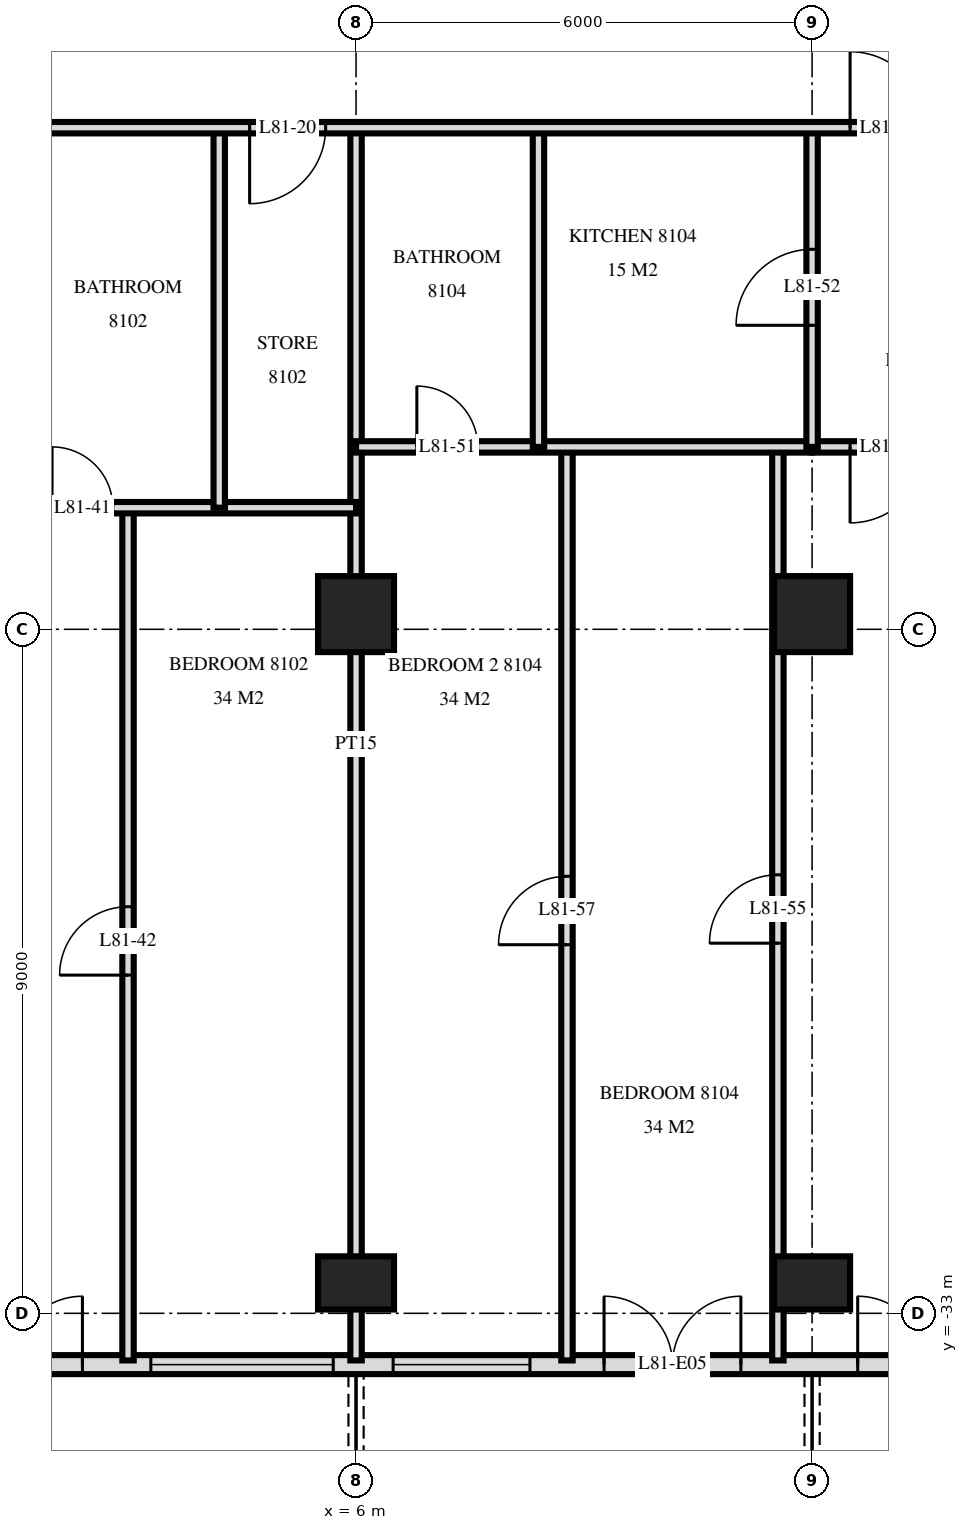
"""IFC4 building model, lengths in metres.
Left out: names, types, materials, properties, quantities, classifications, styles, units other than length and angle.
Written with IfcOpenShell. Run it as: python <this file> out.ifc"""

import sys

from ifc_helpers import new_model, si_unit, direction, frame, frame_2d, origin, origin_2d, place, context, subcontext, project, spatial, rectangle, extrude, element, fill, save


model = new_model("IFC4")
c1 = context("Model", 3, precision=1e-05, world=origin(), true_north=direction((0.0, 1.0)))
c2 = subcontext(c1, "Body", "Model", "MODEL_VIEW")
j1 = project(units=[si_unit("LENGTHUNIT", "METRE"), si_unit("PLANEANGLEUNIT", "RADIAN")], contexts=[c1])
p1 = place(None, origin())
s1 = spatial("IfcSite", under=j1, at=p1, CompositionType="ELEMENT")
p2 = place(p1, origin())
s2 = spatial("IfcBuilding", under=s1, at=p2, CompositionType="ELEMENT")
p3 = place(p2, frame((0.0, 0.0, 305.1)))
s3 = spatial("IfcBuildingStorey", under=s2, at=p3, CompositionType="ELEMENT", Elevation=305.1)
p4 = place(p3, frame((6.0, -32.6, 0.0), z_axis=(0.0, 0.0, 1.0), x_axis=(1.0, 0.0, 0.0)))
e1 = element("IfcColumn", 1, at=p4, inside=s3, PredefinedType="COLUMN", context=c2, shape_type="SweptSolid", body=[
    extrude(rectangle(XDim=1.0, YDim=0.7, at=origin_2d()), origin(), (0.0, 0.0, 1.0), 3.5),
])
p5 = place(p3, frame((6.0, -23.8, 0.0), z_axis=(0.0, 0.0, 1.0), x_axis=(1.0, 0.0, 0.0)))
e2 = element("IfcColumn", 2, at=p5, inside=s3, PredefinedType="COLUMN", context=c2, shape_type="SweptSolid", body=[
    extrude(rectangle(XDim=1.0, YDim=1.0, at=origin_2d()), origin(), (0.0, 0.0, 1.0), 3.5),
])
p6 = place(p3, frame((12.0, -32.6, 0.0), z_axis=(0.0, 0.0, 1.0), x_axis=(1.0, 0.0, 0.0)))
e3 = element("IfcColumn", 3, at=p6, inside=s3, PredefinedType="COLUMN", context=c2, shape_type="SweptSolid", body=[
    extrude(rectangle(XDim=1.0, YDim=0.7, at=origin_2d()), origin(), (0.0, 0.0, 1.0), 3.5),
])
p7 = place(p3, frame((12.0, -23.8, 0.0), z_axis=(0.0, 0.0, 1.0), x_axis=(1.0, 0.0, 0.0)))
e4 = element("IfcColumn", 4, at=p7, inside=s3, PredefinedType="COLUMN", context=c2, shape_type="SweptSolid", body=[
    extrude(rectangle(XDim=1.0, YDim=1.0, at=origin_2d()), origin(), (0.0, 0.0, 1.0), 3.5),
])
p8 = place(p3, frame((-18.575, -33.675, 0.0), z_axis=(0.0, 0.0, 1.0), x_axis=(1.0, 0.0, 0.0)))
e5 = element("IfcWall", 5, at=p8, inside=s3, PredefinedType="SOLIDWALL", context=c2, shape_type="SweptSolid", body=[
    extrude(rectangle(XDim=37.151, YDim=0.25, at=frame_2d((18.575, 0.0))), origin(), (0.0, 0.0, 1.0), 3.2),
])
p9 = place(p8, frame((1.175, 0.0, 0.0)))
e6 = element("IfcOpeningElement", 6, at=p9, cuts=e5, PredefinedType="OPENING", context=c2, shape_type="SweptSolid", body=[
    extrude(rectangle(XDim=1.8, YDim=2.4, at=frame_2d((0.9, 1.2))), frame((0.0, 0.135, 0.0), z_axis=(0.0, -1.0, 0.0), x_axis=(1.0, 0.0, 0.0)), (0.0, 0.0, 1.0), 0.27),
])
p10 = place(p8, frame((5.637, 0.0, 0.9)))
e7 = element("IfcOpeningElement", 7, at=p10, cuts=e5, PredefinedType="OPENING", context=c2, shape_type="SweptSolid", body=[
    extrude(rectangle(XDim=1.8, YDim=1.5, at=frame_2d((0.9, 0.75))), frame((0.0, 0.135, 0.0), z_axis=(0.0, -1.0, 0.0), x_axis=(1.0, 0.0, 0.0)), (0.0, 0.0, 1.0), 0.27),
])
p11 = place(p8, frame((7.663, 0.0, 0.0)))
e8 = element("IfcOpeningElement", 8, at=p11, cuts=e5, PredefinedType="OPENING", context=c2, shape_type="SweptSolid", body=[
    extrude(rectangle(XDim=1.8, YDim=2.4, at=frame_2d((0.9, 1.2))), frame((0.0, 0.135, 0.0), z_axis=(0.0, -1.0, 0.0), x_axis=(1.0, 0.0, 0.0)), (0.0, 0.0, 1.0), 0.27),
])
p12 = place(p8, frame((9.875, 0.0, 0.9)))
e9 = element("IfcOpeningElement", 9, at=p12, cuts=e5, PredefinedType="OPENING", context=c2, shape_type="SweptSolid", body=[
    extrude(rectangle(XDim=2.4, YDim=1.5, at=frame_2d((1.2, 0.75))), frame((0.0, 0.135, 0.0), z_axis=(0.0, -1.0, 0.0), x_axis=(1.0, 0.0, 0.0)), (0.0, 0.0, 1.0), 0.27),
])
p13 = place(p8, frame((13.175, 0.0, 0.0)))
e10 = element("IfcOpeningElement", 10, at=p13, cuts=e5, PredefinedType="OPENING", context=c2, shape_type="SweptSolid", body=[
    extrude(rectangle(XDim=1.8, YDim=2.4, at=frame_2d((0.9, 1.2))), frame((0.0, 0.135, 0.0), z_axis=(0.0, -1.0, 0.0), x_axis=(1.0, 0.0, 0.0)), (0.0, 0.0, 1.0), 0.27),
])
p14 = place(p8, frame((15.875, 0.0, 0.9)))
e11 = element("IfcOpeningElement", 11, at=p14, cuts=e5, PredefinedType="OPENING", context=c2, shape_type="SweptSolid", body=[
    extrude(rectangle(XDim=2.4, YDim=1.5, at=frame_2d((1.2, 0.75))), frame((0.0, 0.135, 0.0), z_axis=(0.0, -1.0, 0.0), x_axis=(1.0, 0.0, 0.0)), (0.0, 0.0, 1.0), 0.27),
])
p15 = place(p8, frame((19.175, 0.0, 0.0)))
e12 = element("IfcOpeningElement", 12, at=p15, cuts=e5, PredefinedType="OPENING", context=c2, shape_type="SweptSolid", body=[
    extrude(rectangle(XDim=1.8, YDim=2.4, at=frame_2d((0.9, 1.2))), frame((0.0, 0.135, 0.0), z_axis=(0.0, -1.0, 0.0), x_axis=(1.0, 0.0, 0.0)), (0.0, 0.0, 1.0), 0.27),
])
p16 = place(p8, frame((21.875, 0.0, 0.9)))
e13 = element("IfcOpeningElement", 13, at=p16, cuts=e5, PredefinedType="OPENING", context=c2, shape_type="SweptSolid", body=[
    extrude(rectangle(XDim=2.4, YDim=1.5, at=frame_2d((1.2, 0.75))), frame((0.0, 0.135, 0.0), z_axis=(0.0, -1.0, 0.0), x_axis=(1.0, 0.0, 0.0)), (0.0, 0.0, 1.0), 0.27),
])
p17 = place(p8, frame((25.063, 0.0, 0.9)))
e14 = element("IfcOpeningElement", 14, at=p17, cuts=e5, PredefinedType="OPENING", context=c2, shape_type="SweptSolid", body=[
    extrude(rectangle(XDim=1.8, YDim=1.5, at=frame_2d((0.9, 0.75))), frame((0.0, 0.135, 0.0), z_axis=(0.0, -1.0, 0.0), x_axis=(1.0, 0.0, 0.0)), (0.0, 0.0, 1.0), 0.27),
])
p18 = place(p8, frame((27.838, 0.0, 0.0)))
e15 = element("IfcOpeningElement", 15, at=p18, cuts=e5, PredefinedType="OPENING", context=c2, shape_type="SweptSolid", body=[
    extrude(rectangle(XDim=1.8, YDim=2.4, at=frame_2d((0.9, 1.2))), frame((0.0, 0.135, 0.0), z_axis=(0.0, -1.0, 0.0), x_axis=(1.0, 0.0, 0.0)), (0.0, 0.0, 1.0), 0.27),
])
p19 = place(p8, frame((31.175, 0.0, 0.0)))
e16 = element("IfcOpeningElement", 16, at=p19, cuts=e5, PredefinedType="OPENING", context=c2, shape_type="SweptSolid", body=[
    extrude(rectangle(XDim=1.8, YDim=2.4, at=frame_2d((0.9, 1.2))), frame((0.0, 0.135, 0.0), z_axis=(0.0, -1.0, 0.0), x_axis=(1.0, 0.0, 0.0)), (0.0, 0.0, 1.0), 0.27),
])
p20 = place(p3, frame((12.0, -21.6, 0.0), z_axis=(0.0, 0.0, 1.0), x_axis=(0.0, 1.0, 0.0)))
e17 = element("IfcWall", 17, at=p20, inside=s3, PredefinedType="PARTITIONING", context=c2, shape_type="SweptSolid", body=[
    extrude(rectangle(XDim=4.2, YDim=0.15, at=frame_2d((2.1, 0.0))), origin(), (0.0, 0.0, 1.0), 3.22),
])
p21 = place(p20, frame((1.6, 0.0, 0.0)))
e18 = element("IfcOpeningElement", 18, at=p21, cuts=e17, PredefinedType="OPENING", context=c2, shape_type="SweptSolid", body=[
    extrude(rectangle(XDim=1.0, YDim=2.1, at=frame_2d((0.5, 1.05))), frame((0.0, 0.085, 0.0), z_axis=(0.0, -1.0, 0.0), x_axis=(1.0, 0.0, 0.0)), (0.0, 0.0, 1.0), 0.17),
])
p22 = place(p3, frame((11.55, -33.62, 0.0), z_axis=(0.0, 0.0, 1.0), x_axis=(0.0, 1.0, 0.0)))
e19 = element("IfcWall", 19, at=p22, inside=s3, PredefinedType="PARTITIONING", context=c2, shape_type="SweptSolid", body=[
    extrude(rectangle(XDim=12.02, YDim=0.15, at=frame_2d((6.01, 0.0))), origin(), (0.0, 0.0, 1.0), 3.22),
])
p23 = place(p22, frame((5.49, 0.0, 0.0)))
e20 = element("IfcOpeningElement", 20, at=p23, cuts=e19, PredefinedType="OPENING", context=c2, shape_type="SweptSolid", body=[
    extrude(rectangle(XDim=0.9, YDim=2.1, at=frame_2d((0.45, 1.05))), frame((0.0, 0.085, 0.0), z_axis=(0.0, -1.0, 0.0), x_axis=(1.0, 0.0, 0.0)), (0.0, 0.0, 1.0), 0.17),
])
p24 = place(p3, frame((8.775, -33.62, 0.0), z_axis=(0.0, 0.0, 1.0), x_axis=(0.0, 1.0, 0.0)))
e21 = element("IfcWall", 21, at=p24, inside=s3, PredefinedType="PARTITIONING", context=c2, shape_type="SweptSolid", body=[
    extrude(rectangle(XDim=12.02, YDim=0.15, at=frame_2d((6.01, 0.0))), origin(), (0.0, 0.0, 1.0), 3.22),
])
p25 = place(p24, frame((5.47, 0.0, 0.0)))
e22 = element("IfcOpeningElement", 22, at=p25, cuts=e21, PredefinedType="OPENING", context=c2, shape_type="SweptSolid", body=[
    extrude(rectangle(XDim=0.9, YDim=2.1, at=frame_2d((0.45, 1.05))), frame((0.0, 0.085, 0.0), z_axis=(0.0, -1.0, 0.0), x_axis=(1.0, 0.0, 0.0)), (0.0, 0.0, 1.0), 0.17),
])
p26 = place(p3, frame((8.4, -21.6, 0.0), z_axis=(0.0, 0.0, 1.0), x_axis=(0.0, 1.0, 0.0)))
e23 = element("IfcWall", 23, at=p26, inside=s3, PredefinedType="PARTITIONING", context=c2, shape_type="SweptSolid", body=[
    extrude(rectangle(XDim=4.2, YDim=0.15, at=frame_2d((2.1, 0.0))), origin(), (0.0, 0.0, 1.0), 3.22),
])
p27 = place(p3, frame((6.0, -33.62, 0.0), z_axis=(0.0, 0.0, 1.0), x_axis=(0.0, 1.0, 0.0)))
e24 = element("IfcWall", 24, at=p27, inside=s3, PredefinedType="PARTITIONING", context=c2, shape_type="SweptSolid", body=[
    extrude(rectangle(XDim=16.22, YDim=0.15, at=frame_2d((8.11, 0.0))), origin(), (0.0, 0.0, 1.0), 3.22),
])
p28 = place(p3, frame((4.2, -22.4, 0.0), z_axis=(0.0, 0.0, 1.0), x_axis=(0.0, 1.0, 0.0)))
e25 = element("IfcWall", 25, at=p28, inside=s3, PredefinedType="PARTITIONING", context=c2, shape_type="SweptSolid", body=[
    extrude(rectangle(XDim=5.0, YDim=0.15, at=frame_2d((2.5, 0.0))), origin(), (0.0, 0.0, 1.0), 3.22),
])
p29 = place(p3, frame((3.0, -33.62, 0.0), z_axis=(0.0, 0.0, 1.0), x_axis=(0.0, 1.0, 0.0)))
e26 = element("IfcWall", 26, at=p29, inside=s3, PredefinedType="PARTITIONING", context=c2, shape_type="SweptSolid", body=[
    extrude(rectangle(XDim=11.22, YDim=0.15, at=frame_2d((5.61, 0.0))), origin(), (0.0, 0.0, 1.0), 3.22),
])
p30 = place(p29, frame((5.07, 0.0, 0.0)))
e27 = element("IfcOpeningElement", 27, at=p30, cuts=e26, PredefinedType="OPENING", context=c2, shape_type="SweptSolid", body=[
    extrude(rectangle(XDim=0.9, YDim=2.1, at=frame_2d((0.45, 1.05))), frame((0.0, 0.085, 0.0), z_axis=(0.0, -1.0, 0.0), x_axis=(1.0, 0.0, 0.0)), (0.0, 0.0, 1.0), 0.17),
])
p31 = place(p3, frame((-1.2, -22.4, 0.0), z_axis=(0.0, 0.0, 1.0), x_axis=(1.0, 0.0, 0.0)))
e28 = element("IfcWall", 28, at=p31, inside=s3, PredefinedType="PARTITIONING", context=c2, shape_type="SweptSolid", body=[
    extrude(rectangle(XDim=7.2, YDim=0.15, at=frame_2d((3.6, 0.0))), origin(), (0.0, 0.0, 1.0), 3.22),
])
p32 = place(p31, frame((3.2, 0.0, 0.0)))
e29 = element("IfcOpeningElement", 29, at=p32, cuts=e28, PredefinedType="OPENING", context=c2, shape_type="SweptSolid", body=[
    extrude(rectangle(XDim=0.8, YDim=2.1, at=frame_2d((0.4, 1.05))), frame((0.0, 0.085, 0.0), z_axis=(0.0, -1.0, 0.0), x_axis=(1.0, 0.0, 0.0)), (0.0, 0.0, 1.0), 0.17),
])
p33 = place(p3, frame((12.0, -21.6, 0.0), z_axis=(0.0, 0.0, 1.0), x_axis=(1.0, 0.0, 0.0)))
e30 = element("IfcWall", 30, at=p33, inside=s3, PredefinedType="PARTITIONING", context=c2, shape_type="SweptSolid", body=[
    extrude(rectangle(XDim=2.0, YDim=0.15, at=frame_2d((1.0, 0.0))), origin(), (0.0, 0.0, 1.0), 3.22),
])
p34 = place(p33, frame((0.5, 0.0, 0.0)))
e31 = element("IfcOpeningElement", 31, at=p34, cuts=e30, PredefinedType="OPENING", context=c2, shape_type="SweptSolid", body=[
    extrude(rectangle(XDim=1.0, YDim=2.1, at=frame_2d((0.5, 1.05))), frame((0.0, 0.085, 0.0), z_axis=(0.0, -1.0, 0.0), x_axis=(1.0, 0.0, 0.0)), (0.0, 0.0, 1.0), 0.17),
])
p35 = place(p3, frame((6.0, -21.6, 0.0), z_axis=(0.0, 0.0, 1.0), x_axis=(1.0, 0.0, 0.0)))
e32 = element("IfcWall", 32, at=p35, inside=s3, PredefinedType="PARTITIONING", context=c2, shape_type="SweptSolid", body=[
    extrude(rectangle(XDim=6.0, YDim=0.15, at=frame_2d((3.0, 0.0))), origin(), (0.0, 0.0, 1.0), 3.22),
])
p36 = place(p35, frame((0.8, 0.0, 0.0)))
e33 = element("IfcOpeningElement", 33, at=p36, cuts=e32, PredefinedType="OPENING", context=c2, shape_type="SweptSolid", body=[
    extrude(rectangle(XDim=0.8, YDim=2.1, at=frame_2d((0.4, 1.05))), frame((0.0, 0.085, 0.0), z_axis=(0.0, -1.0, 0.0), x_axis=(1.0, 0.0, 0.0)), (0.0, 0.0, 1.0), 0.17),
])
p37 = place(p3, frame((-22.92, -17.4, 0.0), z_axis=(0.0, 0.0, 1.0), x_axis=(1.0, 0.0, 0.0)))
e34 = element("IfcWall", 34, at=p37, inside=s3, PredefinedType="PARTITIONING", context=c2, shape_type="SweptSolid", body=[
    extrude(rectangle(XDim=45.84, YDim=0.15, at=frame_2d((22.92, 0.0))), origin(), (0.0, 0.0, 1.0), 3.22),
])
p38 = place(p37, frame((18.67, 0.0, 0.0)))
e35 = element("IfcOpeningElement", 35, at=p38, cuts=e34, PredefinedType="OPENING", context=c2, shape_type="SweptSolid", body=[
    extrude(rectangle(XDim=1.0, YDim=2.1, at=frame_2d((0.5, 1.05))), frame((0.0, 0.085, 0.0), z_axis=(0.0, -1.0, 0.0), x_axis=(1.0, 0.0, 0.0)), (0.0, 0.0, 1.0), 0.17),
])
p39 = place(p37, frame((20.32, 0.0, 0.0)))
e36 = element("IfcOpeningElement", 36, at=p39, cuts=e34, PredefinedType="OPENING", context=c2, shape_type="SweptSolid", body=[
    extrude(rectangle(XDim=1.0, YDim=2.1, at=frame_2d((0.5, 1.05))), frame((0.0, 0.085, 0.0), z_axis=(0.0, -1.0, 0.0), x_axis=(1.0, 0.0, 0.0)), (0.0, 0.0, 1.0), 0.17),
])
p40 = place(p37, frame((27.52, 0.0, 0.0)))
e37 = element("IfcOpeningElement", 37, at=p40, cuts=e34, PredefinedType="OPENING", context=c2, shape_type="SweptSolid", body=[
    extrude(rectangle(XDim=1.0, YDim=2.1, at=frame_2d((0.5, 1.05))), frame((0.0, 0.085, 0.0), z_axis=(0.0, -1.0, 0.0), x_axis=(1.0, 0.0, 0.0)), (0.0, 0.0, 1.0), 0.17),
])
p41 = place(p37, frame((6.42, 0.0, 0.0)))
e38 = element("IfcOpeningElement", 38, at=p41, cuts=e34, PredefinedType="OPENING", context=c2, shape_type="SweptSolid", body=[
    extrude(rectangle(XDim=1.0, YDim=2.1, at=frame_2d((0.5, 1.05))), frame((0.0, 0.085, 0.0), z_axis=(0.0, -1.0, 0.0), x_axis=(1.0, 0.0, 0.0)), (0.0, 0.0, 1.0), 0.17),
])
p42 = place(p37, frame((1.17, 0.0, 0.0)))
e39 = element("IfcOpeningElement", 39, at=p42, cuts=e34, PredefinedType="OPENING", context=c2, shape_type="SweptSolid", body=[
    extrude(rectangle(XDim=1.0, YDim=2.1, at=frame_2d((0.5, 1.05))), frame((0.0, 0.085, 0.0), z_axis=(0.0, -1.0, 0.0), x_axis=(1.0, 0.0, 0.0)), (0.0, 0.0, 1.0), 0.17),
])
p43 = place(p37, frame((35.42, 0.0, 0.0)))
e40 = element("IfcOpeningElement", 40, at=p43, cuts=e34, PredefinedType="OPENING", context=c2, shape_type="SweptSolid", body=[
    extrude(rectangle(XDim=1.0, YDim=2.1, at=frame_2d((0.5, 1.05))), frame((0.0, 0.085, 0.0), z_axis=(0.0, -1.0, 0.0), x_axis=(1.0, 0.0, 0.0)), (0.0, 0.0, 1.0), 0.17),
])
p44 = place(p37, frame((42.17, 0.0, 0.0)))
e41 = element("IfcOpeningElement", 41, at=p44, cuts=e34, PredefinedType="OPENING", context=c2, shape_type="SweptSolid", body=[
    extrude(rectangle(XDim=1.0, YDim=2.1, at=frame_2d((0.5, 1.05))), frame((0.0, 0.085, 0.0), z_axis=(0.0, -1.0, 0.0), x_axis=(1.0, 0.0, 0.0)), (0.0, 0.0, 1.0), 0.17),
])
p45 = place(p15, origin())
e42 = element("IfcDoor", 42, at=p45, inside=s3, OperationType="DOUBLE_DOOR_SINGLE_SWING", PredefinedType="DOOR", context=c2, shape_type="SweptSolid", body=[
    extrude(rectangle(XDim=1.8, YDim=2.4, at=frame_2d((0.9, 1.2))), frame((0.0, 0.025, 0.0), z_axis=(0.0, -1.0, 0.0), x_axis=(1.0, 0.0, 0.0)), (0.0, 0.0, 1.0), 0.05),
])
fill(e12, e42)
p46 = place(p16, origin())
e43 = element("IfcWindow", 43, at=p46, inside=s3, PartitioningType="SINGLE_PANEL", PredefinedType="WINDOW", context=c2, shape_type="SweptSolid", body=[
    extrude(rectangle(XDim=2.4, YDim=1.5, at=frame_2d((1.2, 0.75))), frame((0.0, 0.03, 0.0), z_axis=(0.0, -1.0, 0.0), x_axis=(1.0, 0.0, 0.0)), (0.0, 0.0, 1.0), 0.06),
])
fill(e13, e43)
p47 = place(p17, origin())
e44 = element("IfcWindow", 44, at=p47, inside=s3, PartitioningType="SINGLE_PANEL", PredefinedType="WINDOW", context=c2, shape_type="SweptSolid", body=[
    extrude(rectangle(XDim=1.8, YDim=1.5, at=frame_2d((0.9, 0.75))), frame((0.0, 0.03, 0.0), z_axis=(0.0, -1.0, 0.0), x_axis=(1.0, 0.0, 0.0)), (0.0, 0.0, 1.0), 0.06),
])
fill(e14, e44)
p48 = place(p18, origin())
e45 = element("IfcDoor", 45, at=p48, inside=s3, OperationType="DOUBLE_DOOR_SINGLE_SWING", PredefinedType="DOOR", context=c2, shape_type="SweptSolid", body=[
    extrude(rectangle(XDim=1.8, YDim=2.4, at=frame_2d((0.9, 1.2))), frame((0.0, 0.025, 0.0), z_axis=(0.0, -1.0, 0.0), x_axis=(1.0, 0.0, 0.0)), (0.0, 0.0, 1.0), 0.05),
])
fill(e15, e45)
p49 = place(p19, origin())
e46 = element("IfcDoor", 46, at=p49, inside=s3, OperationType="DOUBLE_DOOR_SINGLE_SWING", PredefinedType="DOOR", context=c2, shape_type="SweptSolid", body=[
    extrude(rectangle(XDim=1.8, YDim=2.4, at=frame_2d((0.9, 1.2))), frame((0.0, 0.025, 0.0), z_axis=(0.0, -1.0, 0.0), x_axis=(1.0, 0.0, 0.0)), (0.0, 0.0, 1.0), 0.05),
])
fill(e16, e46)
p50 = place(p40, frame((0.5, 0.0, 0.0), z_axis=(0.0, 0.0, 1.0), x_axis=(-1.0, 0.0, 0.0)))
e47 = element("IfcDoor", 47, at=p50, inside=s3, OperationType="SINGLE_SWING_LEFT", PredefinedType="DOOR", context=c2, shape_type="SweptSolid", body=[
    extrude(rectangle(XDim=1.0, YDim=2.1, at=frame_2d((0.0, 1.05))), frame((0.0, -0.025, 0.0), z_axis=(0.0, 1.0, 0.0), x_axis=(-1.0, 0.0, 0.0)), (0.0, 0.0, 1.0), 0.05),
])
fill(e37, e47)
p51 = place(p43, origin())
e48 = element("IfcDoor", 48, at=p51, inside=s3, OperationType="SINGLE_SWING_RIGHT", PredefinedType="DOOR", context=c2, shape_type="SweptSolid", body=[
    extrude(rectangle(XDim=1.0, YDim=2.1, at=frame_2d((0.5, 1.05))), frame((0.0, 0.025, 0.0), z_axis=(0.0, -1.0, 0.0), x_axis=(1.0, 0.0, 0.0)), (0.0, 0.0, 1.0), 0.05),
])
fill(e40, e48)
p52 = place(p32, origin())
e49 = element("IfcDoor", 49, at=p52, inside=s3, OperationType="SINGLE_SWING_RIGHT", PredefinedType="DOOR", context=c2, shape_type="SweptSolid", body=[
    extrude(rectangle(XDim=0.8, YDim=2.1, at=frame_2d((0.4, 1.05))), frame((0.0, 0.025, 0.0), z_axis=(0.0, -1.0, 0.0), x_axis=(1.0, 0.0, 0.0)), (0.0, 0.0, 1.0), 0.05),
])
fill(e29, e49)
p53 = place(p30, origin())
e50 = element("IfcDoor", 50, at=p53, inside=s3, OperationType="SINGLE_SWING_RIGHT", PredefinedType="DOOR", context=c2, shape_type="SweptSolid", body=[
    extrude(rectangle(XDim=0.9, YDim=2.1, at=frame_2d((0.45, 1.05))), frame((0.0, 0.025, 0.0), z_axis=(0.0, -1.0, 0.0), x_axis=(1.0, 0.0, 0.0)), (0.0, 0.0, 1.0), 0.05),
])
fill(e27, e50)
p54 = place(p36, origin())
e51 = element("IfcDoor", 51, at=p54, inside=s3, OperationType="SINGLE_SWING_RIGHT", PredefinedType="DOOR", context=c2, shape_type="SweptSolid", body=[
    extrude(rectangle(XDim=0.8, YDim=2.1, at=frame_2d((0.4, 1.05))), frame((0.0, 0.025, 0.0), z_axis=(0.0, -1.0, 0.0), x_axis=(1.0, 0.0, 0.0)), (0.0, 0.0, 1.0), 0.05),
])
fill(e33, e51)
p55 = place(p21, origin())
e52 = element("IfcDoor", 52, at=p55, inside=s3, OperationType="SINGLE_SWING_RIGHT", PredefinedType="DOOR", context=c2, shape_type="SweptSolid", body=[
    extrude(rectangle(XDim=1.0, YDim=2.1, at=frame_2d((0.5, 1.05))), frame((0.0, 0.025, 0.0), z_axis=(0.0, -1.0, 0.0), x_axis=(1.0, 0.0, 0.0)), (0.0, 0.0, 1.0), 0.05),
])
fill(e18, e52)
p56 = place(p34, frame((0.5, 0.0, 0.0), z_axis=(0.0, 0.0, 1.0), x_axis=(-1.0, 0.0, 0.0)))
e53 = element("IfcDoor", 53, at=p56, inside=s3, OperationType="SINGLE_SWING_LEFT", PredefinedType="DOOR", context=c2, shape_type="SweptSolid", body=[
    extrude(rectangle(XDim=1.0, YDim=2.1, at=frame_2d((0.0, 1.05))), frame((0.0, -0.025, 0.0), z_axis=(0.0, 1.0, 0.0), x_axis=(-1.0, 0.0, 0.0)), (0.0, 0.0, 1.0), 0.05),
])
fill(e31, e53)
p57 = place(p23, origin())
e54 = element("IfcDoor", 54, at=p57, inside=s3, OperationType="SINGLE_SWING_RIGHT", PredefinedType="DOOR", context=c2, shape_type="SweptSolid", body=[
    extrude(rectangle(XDim=0.9, YDim=2.1, at=frame_2d((0.45, 1.05))), frame((0.0, 0.025, 0.0), z_axis=(0.0, -1.0, 0.0), x_axis=(1.0, 0.0, 0.0)), (0.0, 0.0, 1.0), 0.05),
])
fill(e20, e54)
p58 = place(p25, origin())
e55 = element("IfcDoor", 55, at=p58, inside=s3, OperationType="SINGLE_SWING_RIGHT", PredefinedType="DOOR", context=c2, shape_type="SweptSolid", body=[
    extrude(rectangle(XDim=0.9, YDim=2.1, at=frame_2d((0.45, 1.05))), frame((0.0, 0.025, 0.0), z_axis=(0.0, -1.0, 0.0), x_axis=(1.0, 0.0, 0.0)), (0.0, 0.0, 1.0), 0.05),
])
fill(e22, e55)
save(model, sys.argv[1])
